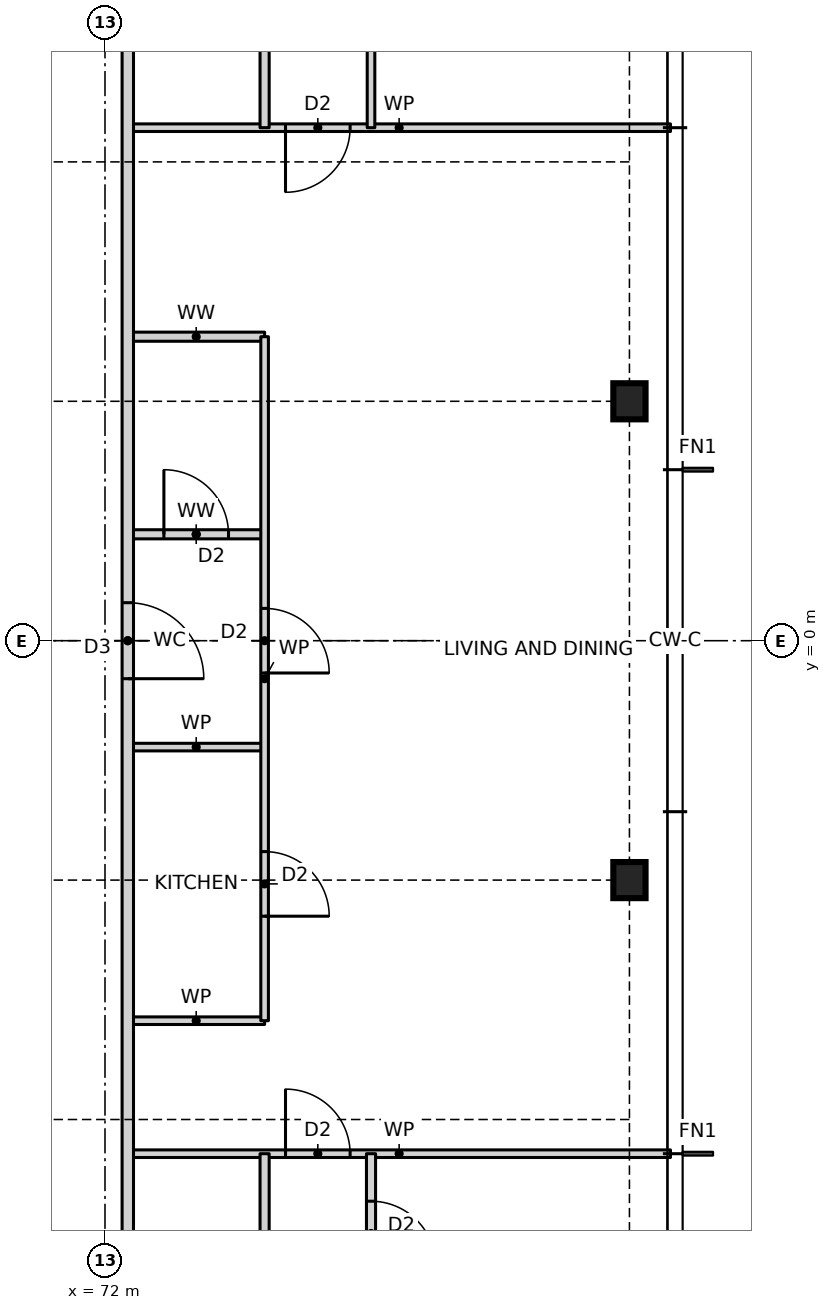
"""IFC4 building model, lengths in metres.
Left out: names, types, materials, properties, quantities, classifications, styles, units other than length and angle.
Written with IfcOpenShell. Run it as: python <this file> out.ifc"""

import sys

from ifc_helpers import new_model, si_unit, direction, frame, frame_2d, origin, origin_2d, place, context, subcontext, project, spatial, rectangle, i_section, extrude, element, fill, save


model = new_model("IFC4")
c1 = context("Model", 3, precision=1e-05, world=origin(), true_north=direction((0.0, 1.0)))
c2 = subcontext(c1, "Body", "Model", "MODEL_VIEW")
j1 = project(units=[si_unit("LENGTHUNIT", "METRE"), si_unit("PLANEANGLEUNIT", "RADIAN")], contexts=[c1])
p1 = place(None, origin())
s1 = spatial("IfcSite", under=j1, at=p1, CompositionType="ELEMENT")
p2 = place(p1, origin())
s2 = spatial("IfcBuilding", under=s1, at=p2, CompositionType="ELEMENT")
p3 = place(p2, frame((0.0, 0.0, 67.5)))
s3 = spatial("IfcBuildingStorey", under=s2, at=p3, CompositionType="ELEMENT", Elevation=67.5)
for number, where, z_axis, x_axis in (
    (1, (78.9, -3.15, 0.0), (0.0, 0.0, 1.0), (1.0, 0.0, 0.0)),
    (2, (78.9, 3.15, 0.0), (0.0, 0.0, 1.0), (1.0, 0.0, 0.0)),
):
    element("IfcColumn", number, at=place(p3, frame(where, z_axis=z_axis, x_axis=x_axis)), inside=s3, PredefinedType="COLUMN", context=c2, shape_type="SweptSolid", body=[
        extrude(i_section(OverallWidth=0.424, OverallDepth=0.475, WebThickness=0.048, FlangeThickness=0.077, at=origin_2d()), origin(), (0.0, 0.0, 1.0), 3.5),
    ])
p4 = place(p3, frame((72.3, -6.75, 0.0), z_axis=(0.0, 0.0, 1.0), x_axis=(1.0, 0.0, 0.0)))
e3 = element("IfcWall", 3, at=p4, inside=s3, PredefinedType="PARTITIONING", context=c2, shape_type="SweptSolid", body=[
    extrude(rectangle(XDim=7.14, YDim=0.1, at=frame_2d((3.57, 0.0))), origin(), (0.0, 0.0, 1.0), 3.27),
])
p5 = place(p4, frame((2.075, 0.0, 0.0)))
e4 = element("IfcOpeningElement", 4, at=p5, cuts=e3, PredefinedType="OPENING", context=c2, shape_type="SweptSolid", body=[
    extrude(rectangle(XDim=0.85, YDim=2.1, at=frame_2d((0.425, 1.05))), frame((0.0, 0.06, 0.0), z_axis=(0.0, -1.0, 0.0), x_axis=(1.0, 0.0, 0.0)), (0.0, 0.0, 1.0), 0.12),
])
for number, where, z_axis, x_axis in (
    (5, (72.3, -5.0, 0.0), (0.0, 0.0, 1.0), (1.0, 0.0, 0.0)),
    (6, (72.3, -1.4, 0.0), (0.0, 0.0, 1.0), (1.0, 0.0, 0.0)),
):
    element("IfcWall", number, at=place(p3, frame(where, z_axis=z_axis, x_axis=x_axis)), inside=s3, PredefinedType="PARTITIONING", context=c2, shape_type="SweptSolid", body=[
        extrude(rectangle(XDim=1.8, YDim=0.1, at=frame_2d((0.9, 0.0))), origin(), (0.0, 0.0, 1.0), 3.27),
    ])
p6 = place(p3, frame((72.3, 1.4, 0.0), z_axis=(0.0, 0.0, 1.0), x_axis=(1.0, 0.0, 0.0)))
e7 = element("IfcWall", 7, at=p6, inside=s3, PredefinedType="PARTITIONING", context=c2, shape_type="SweptSolid", body=[
    extrude(rectangle(XDim=1.8, YDim=0.12, at=frame_2d((0.9, 0.0))), origin(), (0.0, 0.0, 1.0), 3.27),
])
p7 = place(p6, frame((0.475, 0.0, 0.0)))
e8 = element("IfcOpeningElement", 8, at=p7, cuts=e7, PredefinedType="OPENING", context=c2, shape_type="SweptSolid", body=[
    extrude(rectangle(XDim=0.85, YDim=2.1, at=frame_2d((0.425, 1.05))), frame((0.0, 0.07, 0.0), z_axis=(0.0, -1.0, 0.0), x_axis=(1.0, 0.0, 0.0)), (0.0, 0.0, 1.0), 0.14),
])
p8 = place(p3, frame((72.3, 4.0, 0.0), z_axis=(0.0, 0.0, 1.0), x_axis=(1.0, 0.0, 0.0)))
e9 = element("IfcWall", 9, at=p8, inside=s3, PredefinedType="PARTITIONING", context=c2, shape_type="SweptSolid", body=[
    extrude(rectangle(XDim=1.8, YDim=0.12, at=frame_2d((0.9, 0.0))), origin(), (0.0, 0.0, 1.0), 3.27),
])
p9 = place(p3, frame((72.3, 6.75, 0.0), z_axis=(0.0, 0.0, 1.0), x_axis=(1.0, 0.0, 0.0)))
e10 = element("IfcWall", 10, at=p9, inside=s3, PredefinedType="PARTITIONING", context=c2, shape_type="SweptSolid", body=[
    extrude(rectangle(XDim=7.14, YDim=0.1, at=frame_2d((3.57, 0.0))), origin(), (0.0, 0.0, 1.0), 3.27),
])
p10 = place(p9, frame((2.075, 0.0, 0.0)))
e11 = element("IfcOpeningElement", 11, at=p10, cuts=e10, PredefinedType="OPENING", context=c2, shape_type="SweptSolid", body=[
    extrude(rectangle(XDim=0.85, YDim=2.1, at=frame_2d((0.425, 1.05))), frame((0.0, 0.06, 0.0), z_axis=(0.0, -1.0, 0.0), x_axis=(1.0, 0.0, 0.0)), (0.0, 0.0, 1.0), 0.12),
])
p11 = place(p3, frame((75.5, -13.45, 0.0), z_axis=(0.0, 0.0, 1.0), x_axis=(0.0, 1.0, 0.0)))
e12 = element("IfcWall", 12, at=p11, inside=s3, PredefinedType="PARTITIONING", context=c2, shape_type="SweptSolid", body=[
    extrude(rectangle(XDim=6.7, YDim=0.12, at=frame_2d((3.35, 0.0))), origin(), (0.0, 0.0, 1.0), 3.27),
])
p12 = place(p11, frame((5.225, 0.0, 0.0)))
e13 = element("IfcOpeningElement", 13, at=p12, cuts=e12, PredefinedType="OPENING", context=c2, shape_type="SweptSolid", body=[
    extrude(rectangle(XDim=0.85, YDim=2.1, at=frame_2d((0.425, 1.05))), frame((0.0, 0.07, 0.0), z_axis=(0.0, -1.0, 0.0), x_axis=(1.0, 0.0, 0.0)), (0.0, 0.0, 1.0), 0.14),
])
p13 = place(p11, frame((0.675, 0.0, 0.0)))
e14 = element("IfcOpeningElement", 14, at=p13, cuts=e12, PredefinedType="OPENING", context=c2, shape_type="SweptSolid", body=[
    extrude(rectangle(XDim=0.85, YDim=2.1, at=frame_2d((0.425, 1.05))), frame((0.0, 0.07, 0.0), z_axis=(0.0, -1.0, 0.0), x_axis=(1.0, 0.0, 0.0)), (0.0, 0.0, 1.0), 0.14),
])
p14 = place(p3, frame((75.5, 6.75, 0.0), z_axis=(0.0, 0.0, 1.0), x_axis=(0.0, 1.0, 0.0)))
e15 = element("IfcWall", 15, at=p14, inside=s3, PredefinedType="PARTITIONING", context=c2, shape_type="SweptSolid", body=[
    extrude(rectangle(XDim=6.7, YDim=0.1, at=frame_2d((3.35, 0.0))), origin(), (0.0, 0.0, 1.0), 3.27),
])
p15 = place(p14, frame((1.825, 0.0, 0.0)))
e16 = element("IfcOpeningElement", 16, at=p15, cuts=e15, PredefinedType="OPENING", context=c2, shape_type="SweptSolid", body=[
    extrude(rectangle(XDim=0.85, YDim=2.1, at=frame_2d((0.425, 1.05))), frame((0.0, 0.06, 0.0), z_axis=(0.0, -1.0, 0.0), x_axis=(1.0, 0.0, 0.0)), (0.0, 0.0, 1.0), 0.12),
])
p16 = place(p14, frame((5.175, 0.0, 0.0)))
e17 = element("IfcOpeningElement", 17, at=p16, cuts=e15, PredefinedType="OPENING", context=c2, shape_type="SweptSolid", body=[
    extrude(rectangle(XDim=0.85, YDim=2.1, at=frame_2d((0.425, 1.05))), frame((0.0, 0.06, 0.0), z_axis=(0.0, -1.0, 0.0), x_axis=(1.0, 0.0, 0.0)), (0.0, 0.0, 1.0), 0.12),
])
p17 = place(p3, frame((74.1, -12.614, 0.0), z_axis=(0.0, 0.0, 1.0), x_axis=(0.0, 1.0, 0.0)))
e18 = element("IfcWall", 18, at=p17, inside=s3, PredefinedType="PARTITIONING", context=c2, shape_type="SweptSolid", body=[
    extrude(rectangle(XDim=5.864, YDim=0.12, at=frame_2d((2.932, 0.0))), origin(), (0.0, 0.0, 1.0), 3.27),
])
p18 = place(p17, frame((2.507, 0.0, 0.0)))
e19 = element("IfcOpeningElement", 19, at=p18, cuts=e18, PredefinedType="OPENING", context=c2, shape_type="SweptSolid", body=[
    extrude(rectangle(XDim=0.85, YDim=2.1, at=frame_2d((0.425, 1.05))), frame((0.0, 0.07, 0.0), z_axis=(0.0, -1.0, 0.0), x_axis=(1.0, 0.0, 0.0)), (0.0, 0.0, 1.0), 0.14),
])
p19 = place(p3, frame((74.1, -5.0, 0.0), z_axis=(0.0, 0.0, 1.0), x_axis=(0.0, 1.0, 0.0)))
e20 = element("IfcWall", 20, at=p19, inside=s3, PredefinedType="PARTITIONING", context=c2, shape_type="SweptSolid", body=[
    extrude(rectangle(XDim=9.0, YDim=0.1, at=frame_2d((4.5, 0.0))), origin(), (0.0, 0.0, 1.0), 3.27),
])
p20 = place(p19, frame((1.375, 0.0, 0.0)))
e21 = element("IfcOpeningElement", 21, at=p20, cuts=e20, PredefinedType="OPENING", context=c2, shape_type="SweptSolid", body=[
    extrude(rectangle(XDim=0.85, YDim=2.1, at=frame_2d((0.425, 1.05))), frame((0.0, 0.06, 0.0), z_axis=(0.0, -1.0, 0.0), x_axis=(1.0, 0.0, 0.0)), (0.0, 0.0, 1.0), 0.12),
])
p21 = place(p19, frame((4.575, 0.0, 0.0)))
e22 = element("IfcOpeningElement", 22, at=p21, cuts=e20, PredefinedType="OPENING", context=c2, shape_type="SweptSolid", body=[
    extrude(rectangle(XDim=0.85, YDim=2.1, at=frame_2d((0.425, 1.05))), frame((0.0, 0.06, 0.0), z_axis=(0.0, -1.0, 0.0), x_axis=(1.0, 0.0, 0.0)), (0.0, 0.0, 1.0), 0.12),
])
p22 = place(p3, frame((74.1, 6.75, 0.0), z_axis=(0.0, 0.0, 1.0), x_axis=(0.0, 1.0, 0.0)))
e23 = element("IfcWall", 23, at=p22, inside=s3, PredefinedType="PARTITIONING", context=c2, shape_type="SweptSolid", body=[
    extrude(rectangle(XDim=5.864, YDim=0.12, at=frame_2d((2.932, 0.0))), origin(), (0.0, 0.0, 1.0), 3.27),
])
p23 = place(p22, frame((2.507, 0.0, 0.0)))
e24 = element("IfcOpeningElement", 24, at=p23, cuts=e23, PredefinedType="OPENING", context=c2, shape_type="SweptSolid", body=[
    extrude(rectangle(XDim=0.85, YDim=2.1, at=frame_2d((0.425, 1.05))), frame((0.0, 0.07, 0.0), z_axis=(0.0, -1.0, 0.0), x_axis=(1.0, 0.0, 0.0)), (0.0, 0.0, 1.0), 0.14),
])
p24 = place(p3, frame((72.3, -10.568, 0.0), z_axis=(0.0, 0.0, 1.0), x_axis=(0.0, 1.0, 0.0)))
e25 = element("IfcWall", 25, at=p24, inside=s3, PredefinedType="PARTITIONING", context=c2, shape_type="SweptSolid", body=[
    extrude(rectangle(XDim=21.136, YDim=0.15, at=frame_2d((10.568, 0.0))), origin(), (0.0, 0.0, 1.0), 3.27),
])
p25 = place(p24, frame((10.068, 0.0, 0.0)))
e26 = element("IfcOpeningElement", 26, at=p25, cuts=e25, PredefinedType="OPENING", context=c2, shape_type="SweptSolid", body=[
    extrude(rectangle(XDim=1.0, YDim=2.1, at=frame_2d((0.5, 1.05))), frame((0.0, 0.085, 0.0), z_axis=(0.0, -1.0, 0.0), x_axis=(1.0, 0.0, 0.0)), (0.0, 0.0, 1.0), 0.17),
])
p26 = place(p20, frame((0.85, 0.0, 0.0), z_axis=(0.0, 0.0, 1.0), x_axis=(-1.0, 0.0, 0.0)))
e27 = element("IfcDoor", 27, at=p26, inside=s3, OperationType="SINGLE_SWING_RIGHT", PredefinedType="DOOR", context=c2, shape_type="SweptSolid", body=[
    extrude(rectangle(XDim=0.85, YDim=2.1, at=frame_2d((0.425, 1.05))), frame((0.0, 0.025, 0.0), z_axis=(0.0, -1.0, 0.0), x_axis=(1.0, 0.0, 0.0)), (0.0, 0.0, 1.0), 0.05),
])
fill(e21, e27)
p27 = place(p25, frame((1.0, 0.0, 0.0), z_axis=(0.0, 0.0, 1.0), x_axis=(-1.0, 0.0, 0.0)))
e28 = element("IfcDoor", 28, at=p27, inside=s3, OperationType="SINGLE_SWING_RIGHT", PredefinedType="DOOR", context=c2, shape_type="SweptSolid", body=[
    extrude(rectangle(XDim=1.0, YDim=2.1, at=frame_2d((0.5, 1.05))), frame((0.0, 0.025, 0.0), z_axis=(0.0, -1.0, 0.0), x_axis=(1.0, 0.0, 0.0)), (0.0, 0.0, 1.0), 0.05),
])
fill(e26, e28)
p28 = place(p21, frame((0.85, 0.0, 0.0), z_axis=(0.0, 0.0, 1.0), x_axis=(-1.0, 0.0, 0.0)))
e29 = element("IfcDoor", 29, at=p28, inside=s3, OperationType="SINGLE_SWING_RIGHT", PredefinedType="DOOR", context=c2, shape_type="SweptSolid", body=[
    extrude(rectangle(XDim=0.85, YDim=2.1, at=frame_2d((0.425, 1.05))), frame((0.0, 0.025, 0.0), z_axis=(0.0, -1.0, 0.0), x_axis=(1.0, 0.0, 0.0)), (0.0, 0.0, 1.0), 0.05),
])
fill(e22, e29)
p29 = place(p7, origin())
e30 = element("IfcDoor", 30, at=p29, inside=s3, OperationType="SINGLE_SWING_LEFT", PredefinedType="DOOR", context=c2, shape_type="SweptSolid", body=[
    extrude(rectangle(XDim=0.85, YDim=2.1, at=frame_2d((0.425, 1.05))), frame((0.0, 0.025, 0.0), z_axis=(0.0, -1.0, 0.0), x_axis=(1.0, 0.0, 0.0)), (0.0, 0.0, 1.0), 0.05),
])
fill(e8, e30)
p30 = place(p5, origin())
e31 = element("IfcDoor", 31, at=p30, inside=s3, OperationType="SINGLE_SWING_LEFT", PredefinedType="DOOR", context=c2, shape_type="SweptSolid", body=[
    extrude(rectangle(XDim=0.85, YDim=2.1, at=frame_2d((0.425, 1.05))), frame((0.0, 0.025, 0.0), z_axis=(0.0, -1.0, 0.0), x_axis=(1.0, 0.0, 0.0)), (0.0, 0.0, 1.0), 0.05),
])
fill(e4, e31)
p31 = place(p12, frame((0.85, 0.0, 0.0), z_axis=(0.0, 0.0, 1.0), x_axis=(-1.0, 0.0, 0.0)))
e32 = element("IfcDoor", 32, at=p31, inside=s3, OperationType="SINGLE_SWING_RIGHT", PredefinedType="DOOR", context=c2, shape_type="SweptSolid", body=[
    extrude(rectangle(XDim=0.85, YDim=2.1, at=frame_2d((0.425, 1.05))), frame((0.0, 0.025, 0.0), z_axis=(0.0, -1.0, 0.0), x_axis=(1.0, 0.0, 0.0)), (0.0, 0.0, 1.0), 0.05),
])
fill(e13, e32)
p32 = place(p10, frame((0.85, 0.0, 0.0), z_axis=(0.0, 0.0, 1.0), x_axis=(-1.0, 0.0, 0.0)))
e33 = element("IfcDoor", 33, at=p32, inside=s3, OperationType="SINGLE_SWING_RIGHT", PredefinedType="DOOR", context=c2, shape_type="SweptSolid", body=[
    extrude(rectangle(XDim=0.85, YDim=2.1, at=frame_2d((0.425, 1.05))), frame((0.0, 0.025, 0.0), z_axis=(0.0, -1.0, 0.0), x_axis=(1.0, 0.0, 0.0)), (0.0, 0.0, 1.0), 0.05),
])
fill(e11, e33)
save(model, sys.argv[1])
